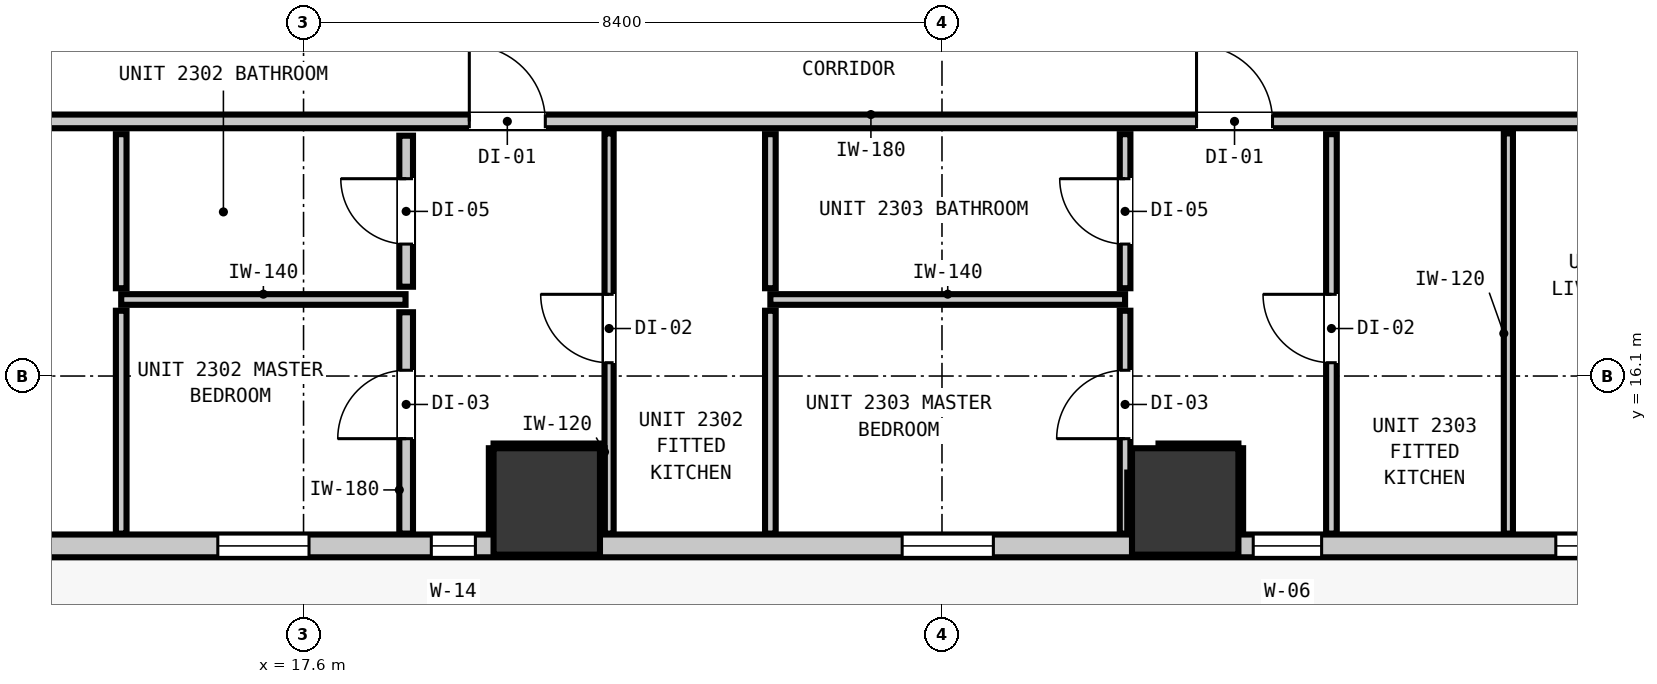
"""IFC4 building model, lengths in metres.
Left out: names, types, materials, properties, quantities, classifications, styles, units other than length and angle.
Written with IfcOpenShell. Run it as: python <this file> out.ifc"""

import sys

from ifc_helpers import new_model, si_unit, direction, frame, frame_2d, origin, origin_2d, place, context, subcontext, project, spatial, rectangle, extrude, element, fill, save


model = new_model("IFC4")
c1 = context("Model", 3, precision=1e-05, world=origin(), true_north=direction((0.0, 1.0)))
c2 = subcontext(c1, "Body", "Model", "MODEL_VIEW")
j1 = project(units=[si_unit("LENGTHUNIT", "METRE"), si_unit("PLANEANGLEUNIT", "RADIAN")], contexts=[c1])
p1 = place(None, origin())
s1 = spatial("IfcSite", under=j1, at=p1, CompositionType="ELEMENT")
p2 = place(p1, origin())
s2 = spatial("IfcBuilding", under=s1, at=p2, CompositionType="ELEMENT")
p3 = place(p2, frame((0.0, 0.0, 81.76)))
s3 = spatial("IfcBuildingStorey", under=s2, at=p3, CompositionType="ELEMENT", Elevation=81.76)
for number, where, z_axis, x_axis in (
    (1, (20.8, 14.45, -0.2), (0.0, 0.0, 1.0), (1.0, 0.0, 0.0)),
    (2, (29.2, 14.45, -0.2), (0.0, 0.0, 1.0), (1.0, 0.0, 0.0)),
):
    element("IfcColumn", number, at=place(p3, frame(where, z_axis=z_axis, x_axis=x_axis)), inside=s3, PredefinedType="COLUMN", context=c2, shape_type="SweptSolid", body=[
        extrude(rectangle(XDim=1.4, YDim=1.4, at=origin_2d()), origin(), (0.0, 0.0, 1.0), 3.52),
    ])
p4 = place(p3, frame((41.635, 13.865, 0.0), z_axis=(0.0, 0.0, 1.0), x_axis=(-1.0, 0.0, 0.0)))
e3 = element("IfcWall", 3, at=p4, inside=s3, PredefinedType="STANDARD", context=c2, shape_type="SweptSolid", body=[
    extrude(rectangle(XDim=37.47, YDim=0.3, at=frame_2d((18.735, 0.0))), origin(), (0.0, 0.0, 1.0), 3.06),
])
p5 = place(p4, frame((1.251, 0.0, 0.0)))
e4 = element("IfcOpeningElement", 4, at=p5, cuts=e3, PredefinedType="OPENING", context=c2, shape_type="SweptSolid", body=[
    extrude(rectangle(XDim=1.0, YDim=2.15, at=frame_2d((0.5, 1.075))), frame((0.0, 0.16, 0.0), z_axis=(0.0, -1.0, 0.0), x_axis=(1.0, 0.0, 0.0)), (0.0, 0.0, 1.0), 0.32),
])
p6 = place(p4, frame((32.235, 0.0, 0.85)))
e5 = element("IfcOpeningElement", 5, at=p6, cuts=e3, PredefinedType="OPENING", context=c2, shape_type="SweptSolid", body=[
    extrude(rectangle(XDim=1.2, YDim=1.8, at=frame_2d((0.6, 0.9))), frame((0.0, 0.16, 0.0), z_axis=(0.0, -1.0, 0.0), x_axis=(1.0, 0.0, 0.0)), (0.0, 0.0, 1.0), 0.32),
])
p7 = place(p4, frame((21.774, 0.0, 0.85)))
e6 = element("IfcOpeningElement", 6, at=p7, cuts=e3, PredefinedType="OPENING", context=c2, shape_type="SweptSolid", body=[
    extrude(rectangle(XDim=0.58, YDim=1.5, at=frame_2d((0.29, 0.75))), frame((0.0, 0.16, 0.0), z_axis=(0.0, -1.0, 0.0), x_axis=(1.0, 0.0, 0.0)), (0.0, 0.0, 1.0), 0.32),
])
p8 = place(p4, frame((23.963, 0.0, 0.85)))
e7 = element("IfcOpeningElement", 7, at=p8, cuts=e3, PredefinedType="OPENING", context=c2, shape_type="SweptSolid", body=[
    extrude(rectangle(XDim=1.2, YDim=1.8, at=frame_2d((0.6, 0.9))), frame((0.0, 0.16, 0.0), z_axis=(0.0, -1.0, 0.0), x_axis=(1.0, 0.0, 0.0)), (0.0, 0.0, 1.0), 0.32),
])
p9 = place(p4, frame((10.64, 0.0, 0.85)))
e8 = element("IfcOpeningElement", 8, at=p9, cuts=e3, PredefinedType="OPENING", context=c2, shape_type="SweptSolid", body=[
    extrude(rectangle(XDim=0.9, YDim=1.5, at=frame_2d((0.45, 0.75))), frame((0.0, 0.16, 0.0), z_axis=(0.0, -1.0, 0.0), x_axis=(1.0, 0.0, 0.0)), (0.0, 0.0, 1.0), 0.32),
])
p10 = place(p4, frame((14.959, 0.0, 0.85)))
e9 = element("IfcOpeningElement", 9, at=p10, cuts=e3, PredefinedType="OPENING", context=c2, shape_type="SweptSolid", body=[
    extrude(rectangle(XDim=1.2, YDim=1.8, at=frame_2d((0.6, 0.9))), frame((0.0, 0.16, 0.0), z_axis=(0.0, -1.0, 0.0), x_axis=(1.0, 0.0, 0.0)), (0.0, 0.0, 1.0), 0.32),
])
p11 = place(p4, frame((6.359, 0.0, 0.85)))
e10 = element("IfcOpeningElement", 10, at=p11, cuts=e3, PredefinedType="OPENING", context=c2, shape_type="SweptSolid", body=[
    extrude(rectangle(XDim=1.2, YDim=1.8, at=frame_2d((0.6, 0.9))), frame((0.0, 0.16, 0.0), z_axis=(0.0, -1.0, 0.0), x_axis=(1.0, 0.0, 0.0)), (0.0, 0.0, 1.0), 0.32),
])
p12 = place(p3, frame((12.993, 19.45, 0.0), z_axis=(0.0, 0.0, 1.0), x_axis=(1.0, 0.0, 0.0)))
e11 = element("IfcWall", 11, at=p12, inside=s3, PredefinedType="PARTITIONING", context=c2, shape_type="SweptSolid", body=[
    extrude(rectangle(XDim=30.98, YDim=0.18, at=frame_2d((15.49, 0.0))), origin(), (0.0, 0.0, 1.0), 3.06),
])
p13 = place(p12, frame((6.788, 0.0, 0.0)))
e12 = element("IfcOpeningElement", 12, at=p13, cuts=e11, PredefinedType="OPENING", context=c2, shape_type="SweptSolid", body=[
    extrude(rectangle(XDim=1.0, YDim=2.15, at=frame_2d((0.5, 1.075))), frame((0.0, 0.1, 0.0), z_axis=(0.0, -1.0, 0.0), x_axis=(1.0, 0.0, 0.0)), (0.0, 0.0, 1.0), 0.2),
])
p14 = place(p12, frame((16.356, 0.0, 0.0)))
e13 = element("IfcOpeningElement", 13, at=p14, cuts=e11, PredefinedType="OPENING", context=c2, shape_type="SweptSolid", body=[
    extrude(rectangle(XDim=1.0, YDim=2.15, at=frame_2d((0.5, 1.075))), frame((0.0, 0.1, 0.0), z_axis=(0.0, -1.0, 0.0), x_axis=(1.0, 0.0, 0.0)), (0.0, 0.0, 1.0), 0.2),
])
p15 = place(p12, frame((23.733, 0.0, 0.0)))
e14 = element("IfcOpeningElement", 14, at=p15, cuts=e11, PredefinedType="OPENING", context=c2, shape_type="SweptSolid", body=[
    extrude(rectangle(XDim=1.0, YDim=2.15, at=frame_2d((0.5, 1.075))), frame((0.0, 0.1, 0.0), z_axis=(0.0, -1.0, 0.0), x_axis=(1.0, 0.0, 0.0)), (0.0, 0.0, 1.0), 0.2),
])
p16 = place(p3, frame((15.201, 17.107, 0.0), z_axis=(0.0, 0.0, 1.0), x_axis=(1.0, 0.0, 0.0)))
e15 = element("IfcWall", 15, at=p16, inside=s3, PredefinedType="PARTITIONING", context=c2, shape_type="SweptSolid", body=[
    extrude(rectangle(XDim=3.741, YDim=0.14, at=frame_2d((1.871, 0.0))), origin(), (0.0, 0.0, 1.0), 3.06),
])
p17 = place(p3, frame((23.742, 17.107, 0.0), z_axis=(0.0, 0.0, 1.0), x_axis=(1.0, 0.0, 0.0)))
e16 = element("IfcWall", 16, at=p17, inside=s3, PredefinedType="PARTITIONING", context=c2, shape_type="SweptSolid", body=[
    extrude(rectangle(XDim=4.667, YDim=0.14, at=frame_2d((2.333, 0.0))), origin(), (0.0, 0.0, 1.0), 3.06),
])
p18 = place(p3, frame((18.95, 14.027, 0.0), z_axis=(0.0, 0.0, 1.0), x_axis=(0.0, 1.0, 0.0)))
e17 = element("IfcWall", 17, at=p18, inside=s3, PredefinedType="PARTITIONING", context=c2, shape_type="SweptSolid", body=[
    extrude(rectangle(XDim=2.912, YDim=0.18, at=frame_2d((1.456, 0.0))), origin(), (0.0, 0.0, 1.0), 3.06),
])
p19 = place(p18, frame((1.249, 0.0, 0.0)))
e18 = element("IfcOpeningElement", 18, at=p19, cuts=e17, PredefinedType="OPENING", context=c2, shape_type="SweptSolid", body=[
    extrude(rectangle(XDim=0.9, YDim=2.1, at=frame_2d((0.45, 1.05))), frame((0.0, 0.1, 0.0), z_axis=(0.0, -1.0, 0.0), x_axis=(1.0, 0.0, 0.0)), (0.0, 0.0, 1.0), 0.2),
])
p20 = place(p3, frame((18.95, 17.275, 0.0), z_axis=(0.0, 0.0, 1.0), x_axis=(0.0, 1.0, 0.0)))
e19 = element("IfcWall", 19, at=p20, inside=s3, PredefinedType="PARTITIONING", context=c2, shape_type="SweptSolid", body=[
    extrude(rectangle(XDim=1.987, YDim=0.18, at=frame_2d((0.994, 0.0))), origin(), (0.0, 0.0, 1.0), 3.06),
])
p21 = place(p20, frame((0.561, 0.0, 0.0)))
e20 = element("IfcOpeningElement", 20, at=p21, cuts=e19, PredefinedType="OPENING", context=c2, shape_type="SweptSolid", body=[
    extrude(rectangle(XDim=0.86, YDim=2.02, at=frame_2d((0.43, 1.01))), frame((0.0, 0.1, 0.0), z_axis=(0.0, -1.0, 0.0), x_axis=(1.0, 0.0, 0.0)), (0.0, 0.0, 1.0), 0.2),
])
p22 = place(p3, frame((15.201, 14.027, 0.0), z_axis=(0.0, 0.0, 1.0), x_axis=(0.0, 1.0, 0.0)))
e21 = element("IfcWall", 21, at=p22, inside=s3, PredefinedType="PARTITIONING", context=c2, shape_type="SweptSolid", body=[
    extrude(rectangle(XDim=2.932, YDim=0.14, at=frame_2d((1.466, 0.0))), origin(), (0.0, 0.0, 1.0), 3.06),
])
p23 = place(p3, frame((15.201, 17.255, 0.0), z_axis=(0.0, 0.0, 1.0), x_axis=(0.0, 1.0, 0.0)))
e22 = element("IfcWall", 22, at=p23, inside=s3, PredefinedType="PARTITIONING", context=c2, shape_type="SweptSolid", body=[
    extrude(rectangle(XDim=2.027, YDim=0.14, at=frame_2d((1.014, 0.0))), origin(), (0.0, 0.0, 1.0), 3.06),
])
p24 = place(p3, frame((23.742, 14.027, 0.0), z_axis=(0.0, 0.0, 1.0), x_axis=(0.0, 1.0, 0.0)))
e23 = element("IfcWall", 23, at=p24, inside=s3, PredefinedType="PARTITIONING", context=c2, shape_type="SweptSolid", body=[
    extrude(rectangle(XDim=2.932, YDim=0.14, at=frame_2d((1.466, 0.0))), origin(), (0.0, 0.0, 1.0), 3.06),
])
p25 = place(p3, frame((23.742, 17.255, 0.0), z_axis=(0.0, 0.0, 1.0), x_axis=(0.0, 1.0, 0.0)))
e24 = element("IfcWall", 24, at=p25, inside=s3, PredefinedType="PARTITIONING", context=c2, shape_type="SweptSolid", body=[
    extrude(rectangle(XDim=2.027, YDim=0.14, at=frame_2d((1.014, 0.0))), origin(), (0.0, 0.0, 1.0), 3.06),
])
p26 = place(p3, frame((28.409, 14.027, 0.0), z_axis=(0.0, 0.0, 1.0), x_axis=(0.0, 1.0, 0.0)))
e25 = element("IfcWall", 25, at=p26, inside=s3, PredefinedType="PARTITIONING", context=c2, shape_type="SweptSolid", body=[
    extrude(rectangle(XDim=2.932, YDim=0.14, at=frame_2d((1.466, 0.0))), origin(), (0.0, 0.0, 1.0), 3.06),
])
p27 = place(p26, frame((1.249, 0.0, 0.0)))
e26 = element("IfcOpeningElement", 26, at=p27, cuts=e25, PredefinedType="OPENING", context=c2, shape_type="SweptSolid", body=[
    extrude(rectangle(XDim=0.9, YDim=2.1, at=frame_2d((0.45, 1.05))), frame((0.0, 0.08, 0.0), z_axis=(0.0, -1.0, 0.0), x_axis=(1.0, 0.0, 0.0)), (0.0, 0.0, 1.0), 0.16),
])
p28 = place(p3, frame((28.409, 17.255, 0.0), z_axis=(0.0, 0.0, 1.0), x_axis=(0.0, 1.0, 0.0)))
e27 = element("IfcWall", 27, at=p28, inside=s3, PredefinedType="PARTITIONING", context=c2, shape_type="SweptSolid", body=[
    extrude(rectangle(XDim=2.027, YDim=0.14, at=frame_2d((1.014, 0.0))), origin(), (0.0, 0.0, 1.0), 3.06),
])
p29 = place(p28, frame((0.581, 0.0, 0.0)))
e28 = element("IfcOpeningElement", 28, at=p29, cuts=e27, PredefinedType="OPENING", context=c2, shape_type="SweptSolid", body=[
    extrude(rectangle(XDim=0.86, YDim=2.02, at=frame_2d((0.43, 1.01))), frame((0.0, 0.08, 0.0), z_axis=(0.0, -1.0, 0.0), x_axis=(1.0, 0.0, 0.0)), (0.0, 0.0, 1.0), 0.16),
])
p30 = place(p3, frame((31.124, 14.027, 0.0), z_axis=(0.0, 0.0, 1.0), x_axis=(0.0, 1.0, 0.0)))
e29 = element("IfcWall", 29, at=p30, inside=s3, PredefinedType="PARTITIONING", context=c2, shape_type="SweptSolid", body=[
    extrude(rectangle(XDim=5.255, YDim=0.14, at=frame_2d((2.627, 0.0))), origin(), (0.0, 0.0, 1.0), 3.06),
])
p31 = place(p30, frame((2.248, 0.0, 0.0)))
e30 = element("IfcOpeningElement", 30, at=p31, cuts=e29, PredefinedType="OPENING", context=c2, shape_type="SweptSolid", body=[
    extrude(rectangle(XDim=0.9, YDim=2.1, at=frame_2d((0.45, 1.05))), frame((0.0, 0.08, 0.0), z_axis=(0.0, -1.0, 0.0), x_axis=(1.0, 0.0, 0.0)), (0.0, 0.0, 1.0), 0.16),
])
p32 = place(p3, frame((21.62, 14.027, 0.0), z_axis=(0.0, 0.0, 1.0), x_axis=(0.0, 1.0, 0.0)))
e31 = element("IfcWall", 31, at=p32, inside=s3, PredefinedType="PARTITIONING", context=c2, shape_type="SweptSolid", body=[
    extrude(rectangle(XDim=5.265, YDim=0.12, at=frame_2d((2.632, 0.0))), origin(), (0.0, 0.0, 1.0), 3.06),
])
p33 = place(p32, frame((2.248, 0.0, 0.0)))
e32 = element("IfcOpeningElement", 32, at=p33, cuts=e31, PredefinedType="OPENING", context=c2, shape_type="SweptSolid", body=[
    extrude(rectangle(XDim=0.9, YDim=2.1, at=frame_2d((0.45, 1.05))), frame((0.0, 0.07, 0.0), z_axis=(0.0, -1.0, 0.0), x_axis=(1.0, 0.0, 0.0)), (0.0, 0.0, 1.0), 0.14),
])
p34 = place(p3, frame((33.452, 14.027, 0.0), z_axis=(0.0, 0.0, 1.0), x_axis=(0.0, 1.0, 0.0)))
e33 = element("IfcWall", 33, at=p34, inside=s3, PredefinedType="PARTITIONING", context=c2, shape_type="SweptSolid", body=[
    extrude(rectangle(XDim=5.265, YDim=0.12, at=frame_2d((2.632, 0.0))), origin(), (0.0, 0.0, 1.0), 3.06),
])
p35 = place(p3, frame((20.1, 15.182, 0.0), z_axis=(0.0, 0.0, 1.0), x_axis=(1.0, 0.0, 0.0)))
e34 = element("IfcWall", 34, at=p35, inside=s3, PredefinedType="PARTITIONING", context=c2, shape_type="SweptSolid", body=[
    extrude(rectangle(XDim=1.4, YDim=0.06, at=frame_2d((0.7, 0.0))), origin(), (0.0, 0.0, 1.0), 1.45),
])
for number, where, z_axis, x_axis in (
    (35, (20.068, 14.03, 0.0), (0.0, 0.0, 1.0), (0.0, 1.0, 0.0)),
    (36, (21.532, 14.03, 0.0), (0.0, 0.0, 1.0), (0.0, 1.0, 0.0)),
):
    element("IfcWall", number, at=place(p3, frame(where, z_axis=z_axis, x_axis=x_axis)), inside=s3, PredefinedType="PARTITIONING", context=c2, shape_type="SweptSolid", body=[
        extrude(rectangle(XDim=1.12, YDim=0.06, at=frame_2d((0.56, 0.0))), origin(), (0.0, 0.0, 1.0), 1.45),
    ])
p36 = place(p3, frame((28.849, 15.182, 0.0), z_axis=(0.0, 0.0, 1.0), x_axis=(1.0, 0.0, 0.0)))
e37 = element("IfcWall", 37, at=p36, inside=s3, PredefinedType="PARTITIONING", context=c2, shape_type="SweptSolid", body=[
    extrude(rectangle(XDim=1.051, YDim=0.06, at=frame_2d((0.525, 0.0))), origin(), (0.0, 0.0, 1.0), 1.45),
])
p37 = place(p3, frame((28.468, 14.03, 0.0), z_axis=(0.0, 0.0, 1.0), x_axis=(0.0, 1.0, 0.0)))
e38 = element("IfcWall", 38, at=p37, inside=s3, PredefinedType="PARTITIONING", context=c2, shape_type="SweptSolid", body=[
    extrude(rectangle(XDim=0.8, YDim=0.06, at=frame_2d((0.4, 0.0))), origin(), (0.0, 0.0, 1.0), 1.45),
])
p38 = place(p3, frame((29.932, 14.03, 0.0), z_axis=(0.0, 0.0, 1.0), x_axis=(0.0, 1.0, 0.0)))
e39 = element("IfcWall", 39, at=p38, inside=s3, PredefinedType="PARTITIONING", context=c2, shape_type="SweptSolid", body=[
    extrude(rectangle(XDim=1.12, YDim=0.06, at=frame_2d((0.56, 0.0))), origin(), (0.0, 0.0, 1.0), 1.45),
])
p39 = place(p7, origin())
e40 = element("IfcWindow", 40, at=p39, inside=s3, PartitioningType="SINGLE_PANEL", PredefinedType="WINDOW", context=c2, shape_type="SweptSolid", body=[
    extrude(rectangle(XDim=0.58, YDim=1.5, at=frame_2d((0.29, 0.75))), frame((0.0, 0.03, 0.0), z_axis=(0.0, -1.0, 0.0), x_axis=(1.0, 0.0, 0.0)), (0.0, 0.0, 1.0), 0.06),
])
fill(e6, e40)
p40 = place(p8, origin())
e41 = element("IfcWindow", 41, at=p40, inside=s3, PartitioningType="SINGLE_PANEL", PredefinedType="WINDOW", context=c2, shape_type="SweptSolid", body=[
    extrude(rectangle(XDim=1.2, YDim=1.8, at=frame_2d((0.6, 0.9))), frame((0.0, 0.03, 0.0), z_axis=(0.0, -1.0, 0.0), x_axis=(1.0, 0.0, 0.0)), (0.0, 0.0, 1.0), 0.06),
])
fill(e7, e41)
p41 = place(p9, origin())
e42 = element("IfcWindow", 42, at=p41, inside=s3, PartitioningType="SINGLE_PANEL", PredefinedType="WINDOW", context=c2, shape_type="SweptSolid", body=[
    extrude(rectangle(XDim=0.9, YDim=1.5, at=frame_2d((0.45, 0.75))), frame((0.0, 0.03, 0.0), z_axis=(0.0, -1.0, 0.0), x_axis=(1.0, 0.0, 0.0)), (0.0, 0.0, 1.0), 0.06),
])
fill(e8, e42)
p42 = place(p10, origin())
e43 = element("IfcWindow", 43, at=p42, inside=s3, PartitioningType="SINGLE_PANEL", PredefinedType="WINDOW", context=c2, shape_type="SweptSolid", body=[
    extrude(rectangle(XDim=1.2, YDim=1.8, at=frame_2d((0.6, 0.9))), frame((0.0, 0.03, 0.0), z_axis=(0.0, -1.0, 0.0), x_axis=(1.0, 0.0, 0.0)), (0.0, 0.0, 1.0), 0.06),
])
fill(e9, e43)
p43 = place(p11, origin())
e44 = element("IfcWindow", 44, at=p43, inside=s3, PartitioningType="SINGLE_PANEL", PredefinedType="WINDOW", context=c2, shape_type="SweptSolid", body=[
    extrude(rectangle(XDim=1.2, YDim=1.8, at=frame_2d((0.6, 0.9))), frame((0.0, 0.03, 0.0), z_axis=(0.0, -1.0, 0.0), x_axis=(1.0, 0.0, 0.0)), (0.0, 0.0, 1.0), 0.06),
])
fill(e10, e44)
p44 = place(p13, origin())
e45 = element("IfcDoor", 45, at=p44, inside=s3, OperationType="SINGLE_SWING_LEFT", PredefinedType="DOOR", context=c2, shape_type="SweptSolid", body=[
    extrude(rectangle(XDim=1.0, YDim=2.15, at=frame_2d((0.5, 1.075))), frame((0.0, 0.025, 0.0), z_axis=(0.0, -1.0, 0.0), x_axis=(1.0, 0.0, 0.0)), (0.0, 0.0, 1.0), 0.05),
])
fill(e12, e45)
p45 = place(p21, origin())
e46 = element("IfcDoor", 46, at=p45, inside=s3, OperationType="SINGLE_SWING_RIGHT", PredefinedType="DOOR", context=c2, shape_type="SweptSolid", body=[
    extrude(rectangle(XDim=0.86, YDim=2.02, at=frame_2d((0.43, 1.01))), frame((0.0, 0.025, 0.0), z_axis=(0.0, -1.0, 0.0), x_axis=(1.0, 0.0, 0.0)), (0.0, 0.0, 1.0), 0.05),
])
fill(e20, e46)
p46 = place(p19, origin())
e47 = element("IfcDoor", 47, at=p46, inside=s3, OperationType="SINGLE_SWING_LEFT", PredefinedType="DOOR", context=c2, shape_type="SweptSolid", body=[
    extrude(rectangle(XDim=0.9, YDim=2.1, at=frame_2d((0.45, 1.05))), frame((0.0, 0.025, 0.0), z_axis=(0.0, -1.0, 0.0), x_axis=(1.0, 0.0, 0.0)), (0.0, 0.0, 1.0), 0.05),
])
fill(e18, e47)
p47 = place(p33, origin())
e48 = element("IfcDoor", 48, at=p47, inside=s3, OperationType="SINGLE_SWING_RIGHT", PredefinedType="DOOR", context=c2, shape_type="SweptSolid", body=[
    extrude(rectangle(XDim=0.9, YDim=2.1, at=frame_2d((0.45, 1.05))), frame((0.0, 0.025, 0.0), z_axis=(0.0, -1.0, 0.0), x_axis=(1.0, 0.0, 0.0)), (0.0, 0.0, 1.0), 0.05),
])
fill(e32, e48)
p48 = place(p14, origin())
e49 = element("IfcDoor", 49, at=p48, inside=s3, OperationType="SINGLE_SWING_LEFT", PredefinedType="DOOR", context=c2, shape_type="SweptSolid", body=[
    extrude(rectangle(XDim=1.0, YDim=2.15, at=frame_2d((0.5, 1.075))), frame((0.0, 0.025, 0.0), z_axis=(0.0, -1.0, 0.0), x_axis=(1.0, 0.0, 0.0)), (0.0, 0.0, 1.0), 0.05),
])
fill(e13, e49)
p49 = place(p29, origin())
e50 = element("IfcDoor", 50, at=p49, inside=s3, OperationType="SINGLE_SWING_RIGHT", PredefinedType="DOOR", context=c2, shape_type="SweptSolid", body=[
    extrude(rectangle(XDim=0.86, YDim=2.02, at=frame_2d((0.43, 1.01))), frame((0.0, 0.025, 0.0), z_axis=(0.0, -1.0, 0.0), x_axis=(1.0, 0.0, 0.0)), (0.0, 0.0, 1.0), 0.05),
])
fill(e28, e50)
p50 = place(p27, origin())
e51 = element("IfcDoor", 51, at=p50, inside=s3, OperationType="SINGLE_SWING_LEFT", PredefinedType="DOOR", context=c2, shape_type="SweptSolid", body=[
    extrude(rectangle(XDim=0.9, YDim=2.1, at=frame_2d((0.45, 1.05))), frame((0.0, 0.025, 0.0), z_axis=(0.0, -1.0, 0.0), x_axis=(1.0, 0.0, 0.0)), (0.0, 0.0, 1.0), 0.05),
])
fill(e26, e51)
p51 = place(p31, origin())
e52 = element("IfcDoor", 52, at=p51, inside=s3, OperationType="SINGLE_SWING_RIGHT", PredefinedType="DOOR", context=c2, shape_type="SweptSolid", body=[
    extrude(rectangle(XDim=0.9, YDim=2.1, at=frame_2d((0.45, 1.05))), frame((0.0, 0.025, 0.0), z_axis=(0.0, -1.0, 0.0), x_axis=(1.0, 0.0, 0.0)), (0.0, 0.0, 1.0), 0.05),
])
fill(e30, e52)
save(model, sys.argv[1])
